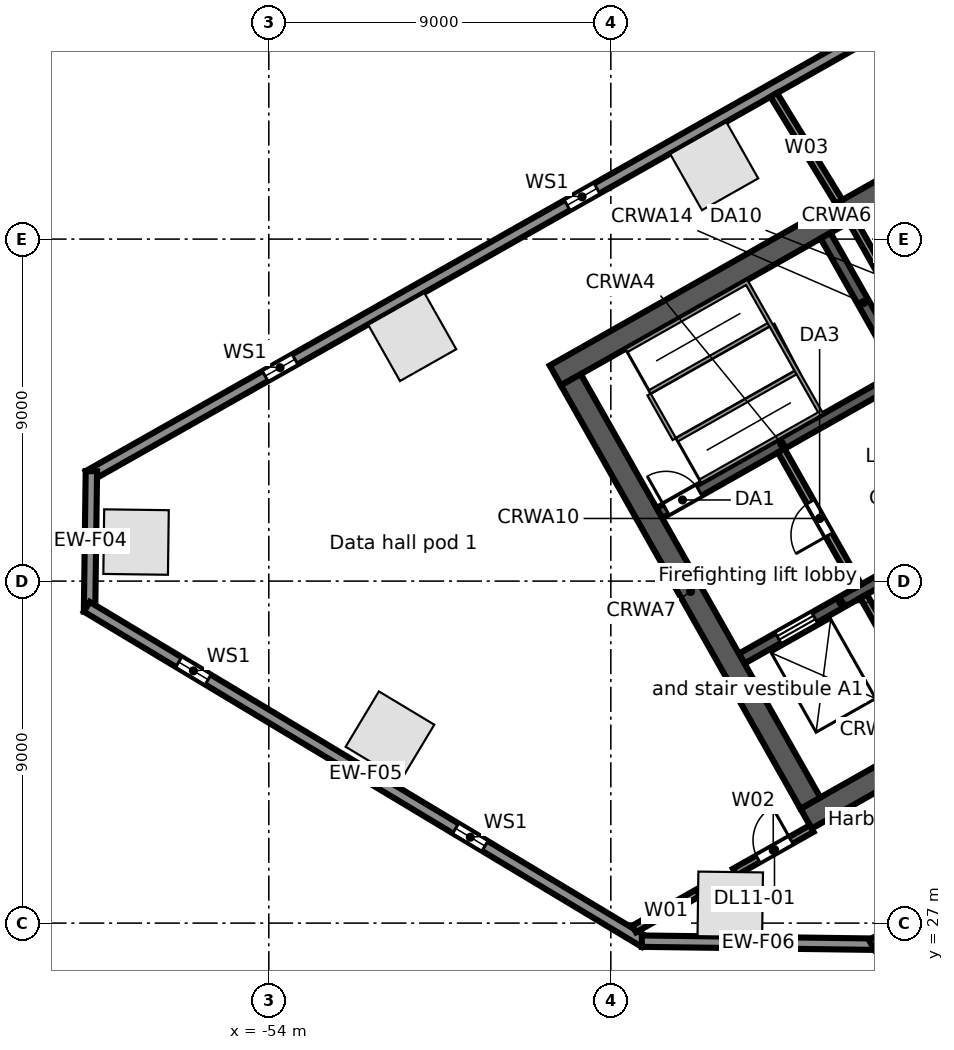
"""IFC4 building model, lengths in metres.
Left out: names, types, materials, properties, quantities, classifications, styles, units other than length and angle.
Written with IfcOpenShell. Run it as: python <this file> out.ifc"""

import sys

from ifc_helpers import new_model, si_unit, direction, frame, frame_2d, origin, origin_2d, place, context, subcontext, project, spatial, rectangle, extrude, element, fill, save


model = new_model("IFC4")
c1 = context("Model", 3, precision=1e-05, world=origin(), true_north=direction((0.0, 1.0)))
c2 = subcontext(c1, "Body", "Model", "MODEL_VIEW")
j1 = project(units=[si_unit("LENGTHUNIT", "METRE"), si_unit("PLANEANGLEUNIT", "RADIAN")], contexts=[c1])
p1 = place(None, origin())
s1 = spatial("IfcSite", under=j1, at=p1, CompositionType="ELEMENT")
p2 = place(p1, origin())
s2 = spatial("IfcBuilding", under=s1, at=p2, CompositionType="ELEMENT")
p3 = place(p2, frame((0.0, 0.0, 56.5)))
s3 = spatial("IfcBuildingStorey", under=s2, at=p3, CompositionType="ELEMENT", Elevation=56.5)
for number, where, z_axis, x_axis in (
    (1, (-42.28, 46.919, 0.0), (0.0, 0.0, 1.0), (-0.87, -0.492, 0.0)),
    (2, (-50.226, 42.423, 0.0), (0.0, 0.0, 1.0), (-0.87, -0.492, 0.0)),
    (3, (-57.493, 37.027, 0.0), (0.0, 0.0, 1.0), (-0.013, -1.0, 0.0)),
    (4, (-50.812, 31.931, 0.0), (0.0, 0.0, 1.0), (0.857, -0.515, 0.0)),
    (5, (-41.858, 27.495, 0.0), (0.0, 0.0, 1.0), (1.0, -0.013, 0.0)),
):
    element("IfcColumn", number, at=place(p3, frame(where, z_axis=z_axis, x_axis=x_axis)), inside=s3, PredefinedType="COLUMN", context=c2, shape_type="SweptSolid", body=[
        extrude(rectangle(XDim=1.7, YDim=1.7, at=origin_2d()), origin(), (0.0, 0.0, 1.0), 5.0),
    ])
p4 = place(p3, frame((-58.745, 38.764, 0.0), z_axis=(0.0, 0.0, 1.0), x_axis=(0.870355811726, 0.492423355453, 0.0)))
e6 = element("IfcWall", 6, at=p4, inside=s3, PredefinedType="STANDARD", context=c2, shape_type="SweptSolid", body=[
    extrude(rectangle(XDim=64.025, YDim=0.3, at=frame_2d((32.013, 0.0))), origin(), (0.0, 0.0, 1.0), 4.68),
])
p5 = place(p4, frame((60.122, 0.0, 0.6)))
e7 = element("IfcOpeningElement", 7, at=p5, cuts=e6, PredefinedType="OPENING", context=c2, shape_type="SweptSolid", body=[
    extrude(rectangle(XDim=0.9, YDim=3.2, at=frame_2d((0.45, 1.6))), frame((0.0, 0.16, 0.0), z_axis=(0.0, -1.0, 0.0), x_axis=(1.0, 0.0, 0.0)), (0.0, 0.0, 1.0), 0.32),
])
p6 = place(p4, frame((50.992, 0.0, 0.6)))
e8 = element("IfcOpeningElement", 8, at=p6, cuts=e6, PredefinedType="OPENING", context=c2, shape_type="SweptSolid", body=[
    extrude(rectangle(XDim=0.9, YDim=3.2, at=frame_2d((0.45, 1.6))), frame((0.0, 0.16, 0.0), z_axis=(0.0, -1.0, 0.0), x_axis=(1.0, 0.0, 0.0)), (0.0, 0.0, 1.0), 0.32),
])
p7 = place(p4, frame((41.862, 0.0, 0.6)))
e9 = element("IfcOpeningElement", 9, at=p7, cuts=e6, PredefinedType="OPENING", context=c2, shape_type="SweptSolid", body=[
    extrude(rectangle(XDim=0.9, YDim=3.2, at=frame_2d((0.45, 1.6))), frame((0.0, 0.16, 0.0), z_axis=(0.0, -1.0, 0.0), x_axis=(1.0, 0.0, 0.0)), (0.0, 0.0, 1.0), 0.32),
])
p8 = place(p4, frame((32.732, 0.0, 0.6)))
e10 = element("IfcOpeningElement", 10, at=p8, cuts=e6, PredefinedType="OPENING", context=c2, shape_type="SweptSolid", body=[
    extrude(rectangle(XDim=0.9, YDim=3.2, at=frame_2d((0.45, 1.6))), frame((0.0, 0.16, 0.0), z_axis=(0.0, -1.0, 0.0), x_axis=(1.0, 0.0, 0.0)), (0.0, 0.0, 1.0), 0.32),
])
p9 = place(p4, frame((23.602, 0.0, 0.6)))
e11 = element("IfcOpeningElement", 11, at=p9, cuts=e6, PredefinedType="OPENING", context=c2, shape_type="SweptSolid", body=[
    extrude(rectangle(XDim=0.9, YDim=3.2, at=frame_2d((0.45, 1.6))), frame((0.0, 0.16, 0.0), z_axis=(0.0, -1.0, 0.0), x_axis=(1.0, 0.0, 0.0)), (0.0, 0.0, 1.0), 0.32),
])
p10 = place(p4, frame((14.472, 0.0, 0.6)))
e12 = element("IfcOpeningElement", 12, at=p10, cuts=e6, PredefinedType="OPENING", context=c2, shape_type="SweptSolid", body=[
    extrude(rectangle(XDim=0.9, YDim=3.2, at=frame_2d((0.45, 1.6))), frame((0.0, 0.16, 0.0), z_axis=(0.0, -1.0, 0.0), x_axis=(1.0, 0.0, 0.0)), (0.0, 0.0, 1.0), 0.32),
])
p11 = place(p4, frame((5.342, 0.0, 0.6)))
e13 = element("IfcOpeningElement", 13, at=p11, cuts=e6, PredefinedType="OPENING", context=c2, shape_type="SweptSolid", body=[
    extrude(rectangle(XDim=0.9, YDim=3.2, at=frame_2d((0.45, 1.6))), frame((0.0, 0.16, 0.0), z_axis=(0.0, -1.0, 0.0), x_axis=(1.0, 0.0, 0.0)), (0.0, 0.0, 1.0), 0.32),
])
p12 = place(p3, frame((-58.717, 35.194, 0.0), z_axis=(0.0, 0.0, 1.0), x_axis=(0.013069053407, 0.999914596275, 0.0)))
e14 = element("IfcWall", 14, at=p12, inside=s3, PredefinedType="STANDARD", context=c2, shape_type="SweptSolid", body=[
    extrude(rectangle(XDim=3.699, YDim=0.3, at=frame_2d((1.849, 0.0))), origin(), (0.0, 0.0, 1.0), 4.68),
])
p13 = place(p3, frame((-44.109, 26.504, 0.0), z_axis=(0.0, 0.0, 1.0), x_axis=(-0.857169502585, 0.515034410344, 0.0)))
e15 = element("IfcWall", 15, at=p13, inside=s3, PredefinedType="STANDARD", context=c2, shape_type="SweptSolid", body=[
    extrude(rectangle(XDim=17.127, YDim=0.3, at=frame_2d((8.563, 0.0))), origin(), (0.0, 0.0, 1.0), 4.68),
])
p14 = place(p13, frame((13.403, 0.0, 0.6)))
e16 = element("IfcOpeningElement", 16, at=p14, cuts=e15, PredefinedType="OPENING", context=c2, shape_type="SweptSolid", body=[
    extrude(rectangle(XDim=0.9, YDim=3.2, at=frame_2d((0.45, 1.6))), frame((0.0, 0.16, 0.0), z_axis=(0.0, -1.0, 0.0), x_axis=(1.0, 0.0, 0.0)), (0.0, 0.0, 1.0), 0.32),
])
p15 = place(p13, frame((4.903, 0.0, 0.6)))
e17 = element("IfcOpeningElement", 17, at=p15, cuts=e15, PredefinedType="OPENING", context=c2, shape_type="SweptSolid", body=[
    extrude(rectangle(XDim=0.9, YDim=3.2, at=frame_2d((0.45, 1.6))), frame((0.0, 0.16, 0.0), z_axis=(0.0, -1.0, 0.0), x_axis=(1.0, 0.0, 0.0)), (0.0, 0.0, 1.0), 0.32),
])
p16 = place(p3, frame((-38.057, 26.445, 0.0), z_axis=(0.0, 0.0, 1.0), x_axis=(-0.999914086342, 0.013108010296, 0.0)))
e18 = element("IfcWall", 18, at=p16, inside=s3, PredefinedType="STANDARD", context=c2, shape_type="SweptSolid", body=[
    extrude(rectangle(XDim=6.128, YDim=0.3, at=frame_2d((3.064, 0.0))), origin(), (0.0, 0.0, 1.0), 4.68),
])
p17 = place(p3, frame((-0.055, 47.969, 0.0), z_axis=(0.0, 0.0, 1.0), x_axis=(-0.870355730478, -0.492423499058, 0.0)))
e19 = element("IfcWall", 19, at=p17, inside=s3, PredefinedType="STANDARD", context=c2, shape_type="SweptSolid", body=[
    extrude(rectangle(XDim=43.75, YDim=0.3, at=frame_2d((21.875, 0.0))), origin(), (0.0, 0.0, 1.0), 4.68),
])
p18 = place(p17, frame((39.977, 0.0, 0.6)))
e20 = element("IfcOpeningElement", 20, at=p18, cuts=e19, PredefinedType="OPENING", context=c2, shape_type="SweptSolid", body=[
    extrude(rectangle(XDim=0.9, YDim=3.2, at=frame_2d((0.45, 1.6))), frame((0.0, 0.16, 0.0), z_axis=(0.0, -1.0, 0.0), x_axis=(1.0, 0.0, 0.0)), (0.0, 0.0, 1.0), 0.32),
])
p19 = place(p17, frame((31.222, 0.0, 0.6)))
e21 = element("IfcOpeningElement", 21, at=p19, cuts=e19, PredefinedType="OPENING", context=c2, shape_type="SweptSolid", body=[
    extrude(rectangle(XDim=0.9, YDim=3.2, at=frame_2d((0.45, 1.6))), frame((0.0, 0.16, 0.0), z_axis=(0.0, -1.0, 0.0), x_axis=(1.0, 0.0, 0.0)), (0.0, 0.0, 1.0), 0.32),
])
p20 = place(p17, frame((22.468, 0.0, 0.6)))
e22 = element("IfcOpeningElement", 22, at=p20, cuts=e19, PredefinedType="OPENING", context=c2, shape_type="SweptSolid", body=[
    extrude(rectangle(XDim=0.9, YDim=3.2, at=frame_2d((0.45, 1.6))), frame((0.0, 0.16, 0.0), z_axis=(0.0, -1.0, 0.0), x_axis=(1.0, 0.0, 0.0)), (0.0, 0.0, 1.0), 0.32),
])
p21 = place(p17, frame((13.713, 0.0, 0.6)))
e23 = element("IfcOpeningElement", 23, at=p21, cuts=e19, PredefinedType="OPENING", context=c2, shape_type="SweptSolid", body=[
    extrude(rectangle(XDim=0.9, YDim=3.2, at=frame_2d((0.45, 1.6))), frame((0.0, 0.16, 0.0), z_axis=(0.0, -1.0, 0.0), x_axis=(1.0, 0.0, 0.0)), (0.0, 0.0, 1.0), 0.32),
])
p22 = place(p17, frame((4.959, 0.0, 0.6)))
e24 = element("IfcOpeningElement", 24, at=p22, cuts=e19, PredefinedType="OPENING", context=c2, shape_type="SweptSolid", body=[
    extrude(rectangle(XDim=0.9, YDim=3.2, at=frame_2d((0.45, 1.6))), frame((0.0, 0.16, 0.0), z_axis=(0.0, -1.0, 0.0), x_axis=(1.0, 0.0, 0.0)), (0.0, 0.0, 1.0), 0.32),
])
p23 = place(p3, frame((-39.862, 29.749, 0.0), z_axis=(0.0, 0.0, 1.0), x_axis=(0.870350116061, 0.492433422375, 0.0)))
e25 = element("IfcWall", 25, at=p23, inside=s3, PredefinedType="SOLIDWALL", context=c2, shape_type="SweptSolid", body=[
    extrude(rectangle(XDim=17.0, YDim=0.6, at=frame_2d((8.5, 0.0))), origin(), (0.0, 0.0, 1.0), 4.68),
])
p24 = place(p23, frame((7.2, 0.0, 0.0)))
e26 = element("IfcOpeningElement", 26, at=p24, cuts=e25, PredefinedType="OPENING", context=c2, shape_type="SweptSolid", body=[
    extrude(rectangle(XDim=1.2, YDim=2.1, at=frame_2d((0.6, 1.05))), frame((0.0, 0.31, 0.0), z_axis=(0.0, -1.0, 0.0), x_axis=(1.0, 0.0, 0.0)), (0.0, 0.0, 1.0), 0.62),
])
p25 = place(p3, frame((-41.556, 33.961, 0.0), z_axis=(0.0, 0.0, 1.0), x_axis=(0.870343731308, 0.492444706919, 0.0)))
e27 = element("IfcWall", 27, at=p25, inside=s3, PredefinedType="SOLIDWALL", context=c2, shape_type="SweptSolid", body=[
    extrude(rectangle(XDim=6.0, YDim=0.3, at=frame_2d((3.0, 0.0))), origin(), (0.0, 0.0, 1.0), 4.68),
])
p26 = place(p25, frame((1.1, 0.0, 0.0)))
e28 = element("IfcOpeningElement", 28, at=p26, cuts=e27, PredefinedType="OPENING", context=c2, shape_type="SweptSolid", body=[
    extrude(rectangle(XDim=1.1, YDim=2.1, at=frame_2d((0.55, 1.05))), frame((0.0, 0.16, 0.0), z_axis=(0.0, -1.0, 0.0), x_axis=(1.0, 0.0, 0.0)), (0.0, 0.0, 1.0), 0.32),
])
p27 = place(p25, frame((4.25, 0.0, 0.0)))
e29 = element("IfcOpeningElement", 29, at=p27, cuts=e27, PredefinedType="OPENING", context=c2, shape_type="SweptSolid", body=[
    extrude(rectangle(XDim=1.1, YDim=2.1, at=frame_2d((0.55, 1.05))), frame((0.0, 0.16, 0.0), z_axis=(0.0, -1.0, 0.0), x_axis=(1.0, 0.0, 0.0)), (0.0, 0.0, 1.0), 0.32),
])
p28 = place(p3, frame((-43.723, 37.791, 0.0), z_axis=(0.0, 0.0, 1.0), x_axis=(0.87035077051, 0.49243226567, 0.0)))
e30 = element("IfcWall", 30, at=p28, inside=s3, PredefinedType="SOLIDWALL", context=c2, shape_type="SweptSolid", body=[
    extrude(rectangle(XDim=7.4, YDim=0.3, at=frame_2d((3.7, 0.0))), origin(), (0.0, 0.0, 1.0), 4.68),
])
p29 = place(p28, frame((0.2, 0.0, 0.0)))
e31 = element("IfcOpeningElement", 31, at=p29, cuts=e30, PredefinedType="OPENING", context=c2, shape_type="SweptSolid", body=[
    extrude(rectangle(XDim=1.0, YDim=2.1, at=frame_2d((0.5, 1.05))), frame((0.0, 0.16, 0.0), z_axis=(0.0, -1.0, 0.0), x_axis=(1.0, 0.0, 0.0)), (0.0, 0.0, 1.0), 0.32),
])
p30 = place(p3, frame((-46.461, 41.412, 0.0), z_axis=(0.0, 0.0, 1.0), x_axis=(0.870350116061, 0.492433422375, 0.0)))
e32 = element("IfcWall", 32, at=p30, inside=s3, PredefinedType="SOLIDWALL", context=c2, shape_type="SweptSolid", body=[
    extrude(rectangle(XDim=17.0, YDim=0.6, at=frame_2d((8.5, 0.0))), origin(), (0.0, 0.0, 1.0), 4.68),
])
p31 = place(p3, frame((-46.052, 41.298, 0.0), z_axis=(0.0, 0.0, 1.0), x_axis=(0.492418598281, -0.870358503186, 0.0)))
e33 = element("IfcWall", 33, at=p31, inside=s3, PredefinedType="SOLIDWALL", context=c2, shape_type="SweptSolid", body=[
    extrude(rectangle(XDim=12.8, YDim=0.6, at=frame_2d((6.4, 0.0))), origin(), (0.0, 0.0, 1.0), 4.68),
])
p32 = place(p3, frame((-38.349, 35.603, 0.0), z_axis=(0.0, 0.0, 1.0), x_axis=(0.49241474071, -0.870360685654, 0.0)))
e34 = element("IfcWall", 34, at=p32, inside=s3, PredefinedType="SOLIDWALL", context=c2, shape_type="SweptSolid", body=[
    extrude(rectangle(XDim=4.05, YDim=0.2, at=frame_2d((2.025, 0.0))), origin(), (0.0, 0.0, 1.0), 4.68),
])
p33 = place(p3, frame((-40.516, 39.433, 0.0), z_axis=(0.0, 0.0, 1.0), x_axis=(0.492453559952, -0.87033872216, 0.0)))
e35 = element("IfcWall", 35, at=p33, inside=s3, PredefinedType="PARTITIONING", context=c2, shape_type="SweptSolid", body=[
    extrude(rectangle(XDim=4.1, YDim=0.2, at=frame_2d((2.05, 0.0))), origin(), (0.0, 0.0, 1.0), 4.68),
])
p34 = place(p33, frame((1.55, 0.0, 0.0)))
e36 = element("IfcOpeningElement", 36, at=p34, cuts=e35, PredefinedType="OPENING", context=c2, shape_type="SweptSolid", body=[
    extrude(rectangle(XDim=1.0, YDim=2.1, at=frame_2d((0.5, 1.05))), frame((0.0, 0.11, 0.0), z_axis=(0.0, -1.0, 0.0), x_axis=(1.0, 0.0, 0.0)), (0.0, 0.0, 1.0), 0.22),
])
p35 = place(p3, frame((-39.35, 45.09, 0.0), z_axis=(0.0, 0.0, 1.0), x_axis=(0.49241474071, -0.870360685654, 0.0)))
e37 = element("IfcWall", 37, at=p35, inside=s3, PredefinedType="SOLIDWALL", context=c2, shape_type="SweptSolid", body=[
    extrude(rectangle(XDim=4.05, YDim=0.3, at=frame_2d((2.025, 0.0))), origin(), (0.0, 0.0, 1.0), 4.68),
])
p36 = place(p3, frame((-38.654, 45.484, 0.0), z_axis=(0.0, 0.0, 1.0), x_axis=(0.492440575896, -0.870346068648, 0.0)))
e38 = element("IfcWall", 38, at=p36, inside=s3, PredefinedType="SOLIDWALL", context=c2, shape_type="SweptSolid", body=[
    extrude(rectangle(XDim=4.05, YDim=0.2, at=frame_2d((2.025, 0.0))), origin(), (0.0, 0.0, 1.0), 4.68),
])
p37 = place(p3, frame((-44.386, 26.845, 0.0), z_axis=(0.0, 0.0, 1.0), x_axis=(0.870226201187, 0.492652371118, 0.0)))
e39 = element("IfcWall", 39, at=p37, inside=s3, PredefinedType="PARTITIONING", context=c2, shape_type="SweptSolid", body=[
    extrude(rectangle(XDim=1.933, YDim=0.2, at=frame_2d((0.966, 0.0))), origin(), (0.0, 0.0, 1.0), 4.68),
])
p38 = place(p3, frame((-41.738, 28.343, 0.0), z_axis=(0.0, 0.0, 1.0), x_axis=(0.870265350095, 0.492583211676, 0.0)))
e40 = element("IfcWall", 40, at=p38, inside=s3, PredefinedType="PARTITIONING", context=c2, shape_type="SweptSolid", body=[
    extrude(rectangle(XDim=2.324, YDim=0.2, at=frame_2d((1.162, 0.0))), origin(), (0.0, 0.0, 1.0), 4.68),
])
p39 = place(p38, frame((0.7, 0.0, 0.0)))
e41 = element("IfcOpeningElement", 41, at=p39, cuts=e40, PredefinedType="OPENING", context=c2, shape_type="SweptSolid", body=[
    extrude(rectangle(XDim=1.0, YDim=2.1, at=frame_2d((0.5, 1.05))), frame((0.0, 0.11, 0.0), z_axis=(0.0, -1.0, 0.0), x_axis=(1.0, 0.0, 0.0)), (0.0, 0.0, 1.0), 0.22),
])
p40 = place(p3, frame((-40.713, 48.794, 0.0), z_axis=(0.0, 0.0, 1.0), x_axis=(0.52165366254, -0.853157345604, 0.0)))
e42 = element("IfcWall", 42, at=p40, inside=s3, PredefinedType="PARTITIONING", context=c2, shape_type="SweptSolid", body=[
    extrude(rectangle(XDim=3.297, YDim=0.2, at=frame_2d((1.648, 0.0))), origin(), (0.0, 0.0, 1.0), 3.96),
])
p41 = place(p10, origin())
e43 = element("IfcWindow", 43, at=p41, inside=s3, PartitioningType="SINGLE_PANEL", PredefinedType="WINDOW", context=c2, shape_type="SweptSolid", body=[
    extrude(rectangle(XDim=0.9, YDim=3.2, at=frame_2d((0.45, 1.6))), frame((0.0, 0.03, 0.0), z_axis=(0.0, -1.0, 0.0), x_axis=(1.0, 0.0, 0.0)), (0.0, 0.0, 1.0), 0.06),
])
fill(e12, e43)
p42 = place(p11, origin())
e44 = element("IfcWindow", 44, at=p42, inside=s3, PartitioningType="SINGLE_PANEL", PredefinedType="WINDOW", context=c2, shape_type="SweptSolid", body=[
    extrude(rectangle(XDim=0.9, YDim=3.2, at=frame_2d((0.45, 1.6))), frame((0.0, 0.03, 0.0), z_axis=(0.0, -1.0, 0.0), x_axis=(1.0, 0.0, 0.0)), (0.0, 0.0, 1.0), 0.06),
])
fill(e13, e44)
p43 = place(p14, origin())
e45 = element("IfcWindow", 45, at=p43, inside=s3, PartitioningType="SINGLE_PANEL", PredefinedType="WINDOW", context=c2, shape_type="SweptSolid", body=[
    extrude(rectangle(XDim=0.9, YDim=3.2, at=frame_2d((0.45, 1.6))), frame((0.0, 0.03, 0.0), z_axis=(0.0, -1.0, 0.0), x_axis=(1.0, 0.0, 0.0)), (0.0, 0.0, 1.0), 0.06),
])
fill(e16, e45)
p44 = place(p15, origin())
e46 = element("IfcWindow", 46, at=p44, inside=s3, PartitioningType="SINGLE_PANEL", PredefinedType="WINDOW", context=c2, shape_type="SweptSolid", body=[
    extrude(rectangle(XDim=0.9, YDim=3.2, at=frame_2d((0.45, 1.6))), frame((0.0, 0.03, 0.0), z_axis=(0.0, -1.0, 0.0), x_axis=(1.0, 0.0, 0.0)), (0.0, 0.0, 1.0), 0.06),
])
fill(e17, e46)
p45 = place(p26, origin())
e47 = element("IfcDoor", 47, at=p45, inside=s3, OperationType="DOUBLE_DOOR_SLIDING", PredefinedType="DOOR", context=c2, shape_type="SweptSolid", body=[
    extrude(rectangle(XDim=1.1, YDim=2.1, at=frame_2d((0.55, 1.05))), frame((0.0, 0.025, 0.0), z_axis=(0.0, -1.0, 0.0), x_axis=(1.0, 0.0, 0.0)), (0.0, 0.0, 1.0), 0.05),
])
fill(e28, e47)
p46 = place(p29, origin())
e48 = element("IfcDoor", 48, at=p46, inside=s3, OperationType="SINGLE_SWING_LEFT", PredefinedType="DOOR", context=c2, shape_type="SweptSolid", body=[
    extrude(rectangle(XDim=1.0, YDim=2.1, at=frame_2d((0.5, 1.05))), frame((0.0, 0.025, 0.0), z_axis=(0.0, -1.0, 0.0), x_axis=(1.0, 0.0, 0.0)), (0.0, 0.0, 1.0), 0.05),
])
fill(e31, e48)
p47 = place(p34, frame((1.0, 0.0, 0.0), z_axis=(0.0, 0.0, 1.0), x_axis=(-1.0, 0.0, 0.0)))
e49 = element("IfcDoor", 49, at=p47, inside=s3, OperationType="SINGLE_SWING_LEFT", PredefinedType="DOOR", context=c2, shape_type="SweptSolid", body=[
    extrude(rectangle(XDim=1.0, YDim=2.1, at=frame_2d((0.5, 1.05))), frame((0.0, 0.025, 0.0), z_axis=(0.0, -1.0, 0.0), x_axis=(1.0, 0.0, 0.0)), (0.0, 0.0, 1.0), 0.05),
])
fill(e36, e49)
p48 = place(p39, origin())
e50 = element("IfcDoor", 50, at=p48, inside=s3, OperationType="SINGLE_SWING_RIGHT", PredefinedType="DOOR", context=c2, shape_type="SweptSolid", body=[
    extrude(rectangle(XDim=1.0, YDim=2.1, at=frame_2d((0.5, 1.05))), frame((0.0, 0.025, 0.0), z_axis=(0.0, -1.0, 0.0), x_axis=(1.0, 0.0, 0.0)), (0.0, 0.0, 1.0), 0.05),
])
fill(e41, e50)
save(model, sys.argv[1])
